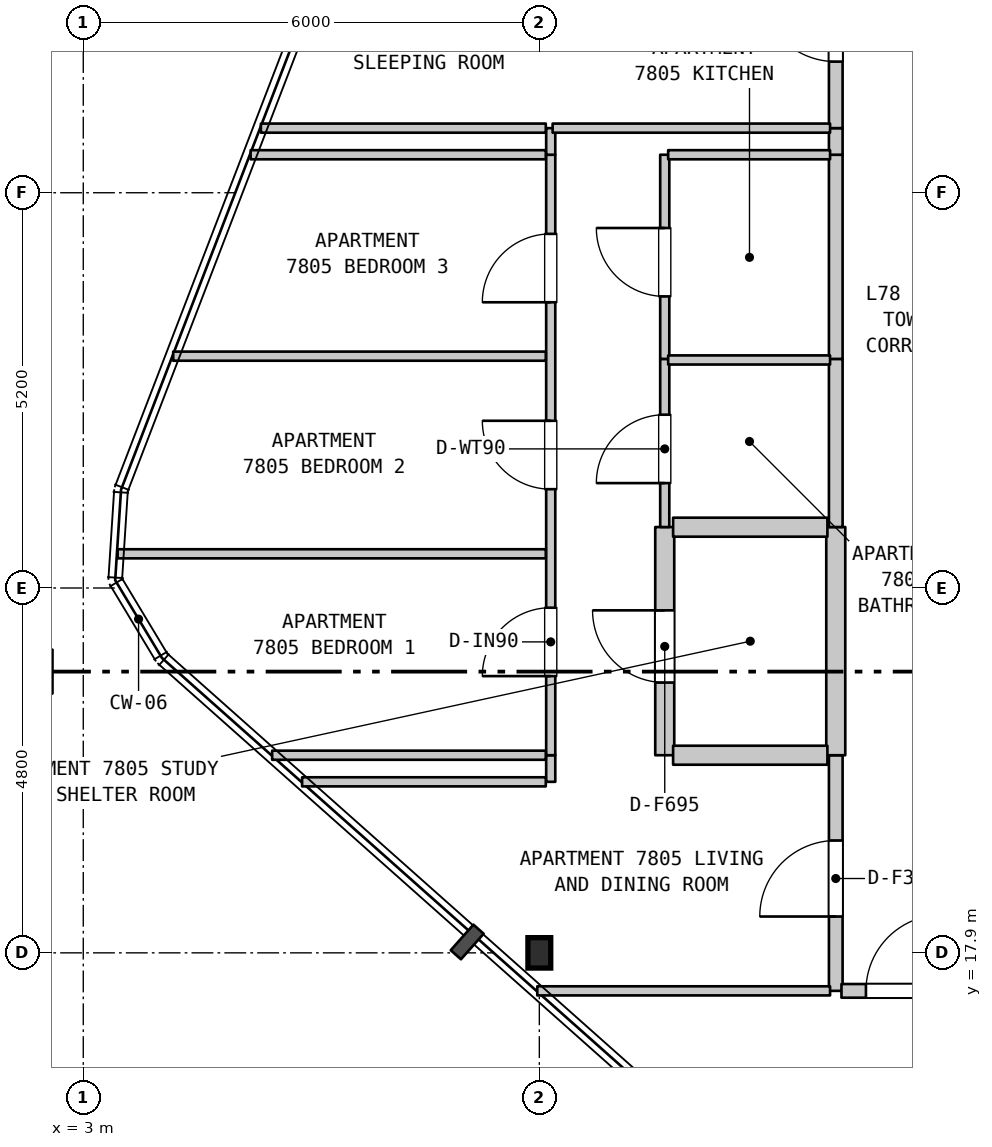
"""IFC4 building model, lengths in metres.
Left out: names, types, materials, properties, quantities, classifications, styles, units other than length and angle.
Written with IfcOpenShell. Run it as: python <this file> out.ifc"""

import sys

from ifc_helpers import new_model, si_unit, direction, frame, frame_2d, origin, origin_2d, place, context, subcontext, project, spatial, rectangle, i_section, extrude, element, fill, save


model = new_model("IFC4")
c1 = context("Model", 3, precision=1e-05, world=origin(), true_north=direction((0.0, 1.0)))
c2 = subcontext(c1, "Body", "Model", "MODEL_VIEW")
j1 = project(units=[si_unit("LENGTHUNIT", "METRE"), si_unit("PLANEANGLEUNIT", "RADIAN")], contexts=[c1])
p1 = place(None, origin())
s1 = spatial("IfcSite", under=j1, at=p1, CompositionType="ELEMENT")
p2 = place(p1, origin())
s2 = spatial("IfcBuilding", under=s1, at=p2, CompositionType="ELEMENT")
p3 = place(p2, frame((0.0, 0.0, 311.0)))
s3 = spatial("IfcBuildingStorey", under=s2, at=p3, CompositionType="ELEMENT", Elevation=311.0)
p4 = place(p3, frame((9.0, 17.9, 0.0), z_axis=(0.0, 0.0, 1.0), x_axis=(1.0, 0.0, 0.0)))
e1 = element("IfcColumn", 1, at=p4, inside=s3, PredefinedType="COLUMN", context=c2, shape_type="SweptSolid", body=[
    extrude(i_section(OverallWidth=0.3, OverallDepth=0.4, WebThickness=0.013, FlangeThickness=0.024, FilletRadius=0.027, at=origin_2d()), origin(), (0.0, 0.0, 1.0), 3.7),
])
p5 = place(p3, frame((9.15, 20.15, 0.0), z_axis=(0.0, 0.0, 1.0), x_axis=(0.0, 1.0, 0.0)))
e2 = element("IfcWall", 2, at=p5, inside=s3, PredefinedType="PARTITIONING", context=c2, shape_type="SweptSolid", body=[
    extrude(rectangle(XDim=0.35, YDim=0.12, at=frame_2d((0.175, 0.0))), origin(), (0.0, 0.0, 1.0), 3.28),
])
p6 = place(p3, frame((9.15, 20.5, 0.0), z_axis=(0.0, 0.0, 1.0), x_axis=(0.0, 1.0, 0.0)))
e3 = element("IfcWall", 3, at=p6, inside=s3, PredefinedType="PARTITIONING", context=c2, shape_type="SweptSolid", body=[
    extrude(rectangle(XDim=7.9, YDim=0.12, at=frame_2d((3.95, 0.0))), origin(), (0.0, 0.0, 1.0), 2.68),
])
p7 = place(p6, frame((1.041, 0.0, 0.0)))
e4 = element("IfcOpeningElement", 4, at=p7, cuts=e3, PredefinedType="OPENING", context=c2, shape_type="SweptSolid", body=[
    extrude(rectangle(XDim=0.9, YDim=2.15, at=frame_2d((0.45, 1.075))), frame((0.0, 0.07, 0.0), z_axis=(0.0, -1.0, 0.0), x_axis=(1.0, 0.0, 0.0)), (0.0, 0.0, 1.0), 0.14),
])
p8 = place(p6, frame((3.5, 0.0, 0.0)))
e5 = element("IfcOpeningElement", 5, at=p8, cuts=e3, PredefinedType="OPENING", context=c2, shape_type="SweptSolid", body=[
    extrude(rectangle(XDim=0.9, YDim=2.15, at=frame_2d((0.45, 1.075))), frame((0.0, 0.07, 0.0), z_axis=(0.0, -1.0, 0.0), x_axis=(1.0, 0.0, 0.0)), (0.0, 0.0, 1.0), 0.14),
])
p9 = place(p6, frame((5.959, 0.0, 0.0)))
e6 = element("IfcOpeningElement", 6, at=p9, cuts=e3, PredefinedType="OPENING", context=c2, shape_type="SweptSolid", body=[
    extrude(rectangle(XDim=0.9, YDim=2.15, at=frame_2d((0.45, 1.075))), frame((0.0, 0.07, 0.0), z_axis=(0.0, -1.0, 0.0), x_axis=(1.0, 0.0, 0.0)), (0.0, 0.0, 1.0), 0.14),
])
p10 = place(p3, frame((9.15, 28.4, 0.0), z_axis=(0.0, 0.0, 1.0), x_axis=(0.0, 1.0, 0.0)))
e7 = element("IfcWall", 7, at=p10, inside=s3, PredefinedType="PARTITIONING", context=c2, shape_type="SweptSolid", body=[
    extrude(rectangle(XDim=0.35, YDim=0.12, at=frame_2d((0.175, 0.0))), origin(), (0.0, 0.0, 1.0), 3.28),
])
p11 = place(p3, frame((10.65, 20.5, 0.0), z_axis=(0.0, 0.0, 1.0), x_axis=(0.0, 1.0, 0.0)))
e8 = element("IfcWall", 8, at=p11, inside=s3, PredefinedType="STANDARD", context=c2, shape_type="SweptSolid", body=[
    extrude(rectangle(XDim=3.002, YDim=0.25, at=frame_2d((1.501, 0.0))), origin(), (0.0, 0.0, 1.0), 3.28),
])
p12 = place(p11, frame((0.956, 0.0, 0.0)))
e9 = element("IfcOpeningElement", 9, at=p12, cuts=e8, PredefinedType="OPENING", context=c2, shape_type="SweptSolid", body=[
    extrude(rectangle(XDim=0.95, YDim=2.15, at=frame_2d((0.475, 1.075))), frame((0.0, 0.135, 0.0), z_axis=(0.0, -1.0, 0.0), x_axis=(1.0, 0.0, 0.0)), (0.0, 0.0, 1.0), 0.27),
])
p13 = place(p3, frame((10.65, 23.502, 0.0), z_axis=(0.0, 0.0, 1.0), x_axis=(0.0, 1.0, 0.0)))
e10 = element("IfcWall", 10, at=p13, inside=s3, PredefinedType="PARTITIONING", context=c2, shape_type="SweptSolid", body=[
    extrude(rectangle(XDim=2.212, YDim=0.12, at=frame_2d((1.106, 0.0))), origin(), (0.0, 0.0, 1.0), 3.28),
])
p14 = place(p13, frame((0.578, 0.0, 0.0)))
e11 = element("IfcOpeningElement", 11, at=p14, cuts=e10, PredefinedType="OPENING", context=c2, shape_type="SweptSolid", body=[
    extrude(rectangle(XDim=0.9, YDim=2.1, at=frame_2d((0.45, 1.05))), frame((0.0, 0.07, 0.0), z_axis=(0.0, -1.0, 0.0), x_axis=(1.0, 0.0, 0.0)), (0.0, 0.0, 1.0), 0.14),
])
p15 = place(p3, frame((10.65, 25.714, 0.0), z_axis=(0.0, 0.0, 1.0), x_axis=(0.0, 1.0, 0.0)))
e12 = element("IfcWall", 12, at=p15, inside=s3, PredefinedType="PARTITIONING", context=c2, shape_type="SweptSolid", body=[
    extrude(rectangle(XDim=2.686, YDim=0.12, at=frame_2d((1.343, 0.0))), origin(), (0.0, 0.0, 1.0), 3.28),
])
p16 = place(p15, frame((0.822, 0.0, 0.0)))
e13 = element("IfcOpeningElement", 13, at=p16, cuts=e12, PredefinedType="OPENING", context=c2, shape_type="SweptSolid", body=[
    extrude(rectangle(XDim=0.9, YDim=2.15, at=frame_2d((0.45, 1.075))), frame((0.0, 0.07, 0.0), z_axis=(0.0, -1.0, 0.0), x_axis=(1.0, 0.0, 0.0)), (0.0, 0.0, 1.0), 0.14),
])
p17 = place(p3, frame((12.9, 17.4, 0.0), z_axis=(0.0, 0.0, 1.0), x_axis=(0.0, 1.0, 0.0)))
e14 = element("IfcWall", 14, at=p17, inside=s3, PredefinedType="STANDARD", context=c2, shape_type="SweptSolid", body=[
    extrude(rectangle(XDim=3.1, YDim=0.18, at=frame_2d((1.55, 0.0))), origin(), (0.0, 0.0, 1.0), 3.28),
])
p18 = place(p17, frame((0.978, 0.0, 0.0)))
e15 = element("IfcOpeningElement", 15, at=p18, cuts=e14, PredefinedType="OPENING", context=c2, shape_type="SweptSolid", body=[
    extrude(rectangle(XDim=1.0, YDim=2.15, at=frame_2d((0.5, 1.075))), frame((0.0, 0.1, 0.0), z_axis=(0.0, -1.0, 0.0), x_axis=(1.0, 0.0, 0.0)), (0.0, 0.0, 1.0), 0.2),
])
p19 = place(p3, frame((12.9, 20.5, 0.0), z_axis=(0.0, 0.0, 1.0), x_axis=(0.0, 1.0, 0.0)))
e16 = element("IfcWall", 16, at=p19, inside=s3, PredefinedType="STANDARD", context=c2, shape_type="SweptSolid", body=[
    extrude(rectangle(XDim=3.002, YDim=0.25, at=frame_2d((1.501, 0.0))), origin(), (0.0, 0.0, 1.0), 3.28),
])
p20 = place(p3, frame((12.9, 23.502, 0.0), z_axis=(0.0, 0.0, 1.0), x_axis=(0.0, 1.0, 0.0)))
e17 = element("IfcWall", 17, at=p20, inside=s3, PredefinedType="STANDARD", context=c2, shape_type="SweptSolid", body=[
    extrude(rectangle(XDim=2.212, YDim=0.18, at=frame_2d((1.106, 0.0))), origin(), (0.0, 0.0, 1.0), 3.28),
])
p21 = place(p3, frame((12.9, 25.714, 0.0), z_axis=(0.0, 0.0, 1.0), x_axis=(0.0, 1.0, 0.0)))
e18 = element("IfcWall", 18, at=p21, inside=s3, PredefinedType="STANDARD", context=c2, shape_type="SweptSolid", body=[
    extrude(rectangle(XDim=2.686, YDim=0.18, at=frame_2d((1.343, 0.0))), origin(), (0.0, 0.0, 1.0), 3.28),
])
p22 = place(p3, frame((12.9, 28.4, 0.0), z_axis=(0.0, 0.0, 1.0), x_axis=(0.0, 1.0, 0.0)))
e19 = element("IfcWall", 19, at=p22, inside=s3, PredefinedType="STANDARD", context=c2, shape_type="SweptSolid", body=[
    extrude(rectangle(XDim=0.35, YDim=0.18, at=frame_2d((0.175, 0.0))), origin(), (0.0, 0.0, 1.0), 3.28),
])
p23 = place(p3, frame((12.9, 28.75, 0.0), z_axis=(0.0, 0.0, 1.0), x_axis=(0.0, 1.0, 0.0)))
e20 = element("IfcWall", 20, at=p23, inside=s3, PredefinedType="STANDARD", context=c2, shape_type="SweptSolid", body=[
    extrude(rectangle(XDim=2.75, YDim=0.18, at=frame_2d((1.375, 0.0))), origin(), (0.0, 0.0, 1.0), 3.28),
])
p24 = place(p23, frame((0.875, 0.0, 0.0)))
e21 = element("IfcOpeningElement", 21, at=p24, cuts=e20, PredefinedType="OPENING", context=c2, shape_type="SweptSolid", body=[
    extrude(rectangle(XDim=1.0, YDim=2.15, at=frame_2d((0.5, 1.075))), frame((0.0, 0.1, 0.0), z_axis=(0.0, -1.0, 0.0), x_axis=(1.0, 0.0, 0.0)), (0.0, 0.0, 1.0), 0.2),
])
p25 = place(p3, frame((8.973, 17.4, 0.0), z_axis=(0.0, 0.0, 1.0), x_axis=(1.0, 0.0, 0.0)))
e22 = element("IfcWall", 22, at=p25, inside=s3, PredefinedType="PARTITIONING", context=c2, shape_type="SweptSolid", body=[
    extrude(rectangle(XDim=3.852, YDim=0.12, at=frame_2d((1.926, 0.0))), origin(), (0.0, 0.0, 1.0), 3.28),
])
p26 = place(p3, frame((12.975, 17.4, 0.0), z_axis=(0.0, 0.0, 1.0), x_axis=(1.0, 0.0, 0.0)))
e23 = element("IfcWall", 23, at=p26, inside=s3, PredefinedType="STANDARD", context=c2, shape_type="SweptSolid", body=[
    extrude(rectangle(XDim=3.68, YDim=0.18, at=frame_2d((1.84, 0.0))), origin(), (0.0, 0.0, 1.0), 3.28),
])
p27 = place(p26, frame((0.322, 0.0, 0.0)))
e24 = element("IfcOpeningElement", 24, at=p27, cuts=e23, PredefinedType="OPENING", context=c2, shape_type="SweptSolid", body=[
    extrude(rectangle(XDim=1.0, YDim=2.15, at=frame_2d((0.5, 1.075))), frame((0.0, 0.1, 0.0), z_axis=(0.0, -1.0, 0.0), x_axis=(1.0, 0.0, 0.0)), (0.0, 0.0, 1.0), 0.2),
])
p28 = place(p3, frame((5.879, 20.15, 0.0), z_axis=(0.0, 0.0, 1.0), x_axis=(1.0, 0.0, 0.0)))
e25 = element("IfcWall", 25, at=p28, inside=s3, PredefinedType="PARTITIONING", context=c2, shape_type="SweptSolid", body=[
    extrude(rectangle(XDim=3.206, YDim=0.12, at=frame_2d((1.603, 0.0))), origin(), (0.0, 0.0, 1.0), 3.28),
])
p29 = place(p3, frame((5.485, 20.5, 0.0), z_axis=(0.0, 0.0, 1.0), x_axis=(1.0, 0.0, 0.0)))
e26 = element("IfcWall", 26, at=p29, inside=s3, PredefinedType="PARTITIONING", context=c2, shape_type="SweptSolid", body=[
    extrude(rectangle(XDim=3.6, YDim=0.12, at=frame_2d((1.8, 0.0))), origin(), (0.0, 0.0, 1.0), 3.28),
])
p30 = place(p3, frame((10.76, 20.5, 0.0), z_axis=(0.0, 0.0, 1.0), x_axis=(1.0, 0.0, 0.0)))
e27 = element("IfcWall", 27, at=p30, inside=s3, PredefinedType="STANDARD", context=c2, shape_type="SweptSolid", body=[
    extrude(rectangle(XDim=2.03, YDim=0.25, at=frame_2d((1.015, 0.0))), origin(), (0.0, 0.0, 1.0), 3.28),
])
p31 = place(p3, frame((3.452, 23.15, 0.0), z_axis=(0.0, 0.0, 1.0), x_axis=(1.0, 0.0, 0.0)))
e28 = element("IfcWall", 28, at=p31, inside=s3, PredefinedType="PARTITIONING", context=c2, shape_type="SweptSolid", body=[
    extrude(rectangle(XDim=5.633, YDim=0.12, at=frame_2d((2.816, 0.0))), origin(), (0.0, 0.0, 1.0), 3.28),
])
p32 = place(p3, frame((10.76, 23.5, 0.0), z_axis=(0.0, 0.0, 1.0), x_axis=(1.0, 0.0, 0.0)))
e29 = element("IfcWall", 29, at=p32, inside=s3, PredefinedType="STANDARD", context=c2, shape_type="SweptSolid", body=[
    extrude(rectangle(XDim=2.03, YDim=0.25, at=frame_2d((1.015, 0.0))), origin(), (0.0, 0.0, 1.0), 3.28),
])
p33 = place(p3, frame((10.695, 25.7, 0.0), z_axis=(0.0, 0.0, 1.0), x_axis=(1.0, 0.0, 0.0)))
e30 = element("IfcWall", 30, at=p33, inside=s3, PredefinedType="PARTITIONING", context=c2, shape_type="SweptSolid", body=[
    extrude(rectangle(XDim=2.13, YDim=0.12, at=frame_2d((1.065, 0.0))), origin(), (0.0, 0.0, 1.0), 3.28),
])
p34 = place(p3, frame((4.183, 25.75, 0.0), z_axis=(0.0, 0.0, 1.0), x_axis=(1.0, 0.0, 0.0)))
e31 = element("IfcWall", 31, at=p34, inside=s3, PredefinedType="PARTITIONING", context=c2, shape_type="SweptSolid", body=[
    extrude(rectangle(XDim=4.902, YDim=0.12, at=frame_2d((2.451, 0.0))), origin(), (0.0, 0.0, 1.0), 3.28),
])
p35 = place(p3, frame((5.202, 28.4, 0.0), z_axis=(0.0, 0.0, 1.0), x_axis=(1.0, 0.0, 0.0)))
e32 = element("IfcWall", 32, at=p35, inside=s3, PredefinedType="PARTITIONING", context=c2, shape_type="SweptSolid", body=[
    extrude(rectangle(XDim=3.883, YDim=0.12, at=frame_2d((1.941, 0.0))), origin(), (0.0, 0.0, 1.0), 3.28),
])
p36 = place(p3, frame((10.695, 28.4, 0.0), z_axis=(0.0, 0.0, 1.0), x_axis=(1.0, 0.0, 0.0)))
e33 = element("IfcWall", 33, at=p36, inside=s3, PredefinedType="PARTITIONING", context=c2, shape_type="SweptSolid", body=[
    extrude(rectangle(XDim=2.13, YDim=0.12, at=frame_2d((1.065, 0.0))), origin(), (0.0, 0.0, 1.0), 3.28),
])
p37 = place(p3, frame((5.337, 28.75, 0.0), z_axis=(0.0, 0.0, 1.0), x_axis=(1.0, 0.0, 0.0)))
e34 = element("IfcWall", 34, at=p37, inside=s3, PredefinedType="PARTITIONING", context=c2, shape_type="SweptSolid", body=[
    extrude(rectangle(XDim=3.748, YDim=0.12, at=frame_2d((1.874, 0.0))), origin(), (0.0, 0.0, 1.0), 3.28),
])
p38 = place(p3, frame((9.175, 28.75, 0.0), z_axis=(0.0, 0.0, 1.0), x_axis=(1.0, 0.0, 0.0)))
e35 = element("IfcWall", 35, at=p38, inside=s3, PredefinedType="PARTITIONING", context=c2, shape_type="SweptSolid", body=[
    extrude(rectangle(XDim=3.65, YDim=0.12, at=frame_2d((1.825, 0.0))), origin(), (0.0, 0.0, 1.0), 3.28),
])
p39 = place(p7, origin())
e36 = element("IfcDoor", 36, at=p39, inside=s3, OperationType="SINGLE_SWING_LEFT", PredefinedType="DOOR", context=c2, shape_type="SweptSolid", body=[
    extrude(rectangle(XDim=0.9, YDim=2.15, at=frame_2d((0.45, 1.075))), frame((0.0, 0.025, 0.0), z_axis=(0.0, -1.0, 0.0), x_axis=(1.0, 0.0, 0.0)), (0.0, 0.0, 1.0), 0.05),
])
fill(e4, e36)
p40 = place(p8, origin())
e37 = element("IfcDoor", 37, at=p40, inside=s3, OperationType="SINGLE_SWING_RIGHT", PredefinedType="DOOR", context=c2, shape_type="SweptSolid", body=[
    extrude(rectangle(XDim=0.9, YDim=2.15, at=frame_2d((0.45, 1.075))), frame((0.0, 0.025, 0.0), z_axis=(0.0, -1.0, 0.0), x_axis=(1.0, 0.0, 0.0)), (0.0, 0.0, 1.0), 0.05),
])
fill(e5, e37)
p41 = place(p9, origin())
e38 = element("IfcDoor", 38, at=p41, inside=s3, OperationType="SINGLE_SWING_LEFT", PredefinedType="DOOR", context=c2, shape_type="SweptSolid", body=[
    extrude(rectangle(XDim=0.9, YDim=2.15, at=frame_2d((0.45, 1.075))), frame((0.0, 0.025, 0.0), z_axis=(0.0, -1.0, 0.0), x_axis=(1.0, 0.0, 0.0)), (0.0, 0.0, 1.0), 0.05),
])
fill(e6, e38)
p42 = place(p12, origin())
e39 = element("IfcDoor", 39, at=p42, inside=s3, OperationType="SINGLE_SWING_RIGHT", PredefinedType="DOOR", context=c2, shape_type="SweptSolid", body=[
    extrude(rectangle(XDim=0.95, YDim=2.15, at=frame_2d((0.475, 1.075))), frame((0.0, 0.025, 0.0), z_axis=(0.0, -1.0, 0.0), x_axis=(1.0, 0.0, 0.0)), (0.0, 0.0, 1.0), 0.05),
])
fill(e9, e39)
p43 = place(p14, origin())
e40 = element("IfcDoor", 40, at=p43, inside=s3, OperationType="SINGLE_SWING_LEFT", PredefinedType="DOOR", context=c2, shape_type="SweptSolid", body=[
    extrude(rectangle(XDim=0.9, YDim=2.1, at=frame_2d((0.45, 1.05))), frame((0.0, 0.025, 0.0), z_axis=(0.0, -1.0, 0.0), x_axis=(1.0, 0.0, 0.0)), (0.0, 0.0, 1.0), 0.05),
])
fill(e11, e40)
p44 = place(p16, origin())
e41 = element("IfcDoor", 41, at=p44, inside=s3, OperationType="SINGLE_SWING_RIGHT", PredefinedType="DOOR", context=c2, shape_type="SweptSolid", body=[
    extrude(rectangle(XDim=0.9, YDim=2.15, at=frame_2d((0.45, 1.075))), frame((0.0, 0.025, 0.0), z_axis=(0.0, -1.0, 0.0), x_axis=(1.0, 0.0, 0.0)), (0.0, 0.0, 1.0), 0.05),
])
fill(e13, e41)
p45 = place(p18, origin())
e42 = element("IfcDoor", 42, at=p45, inside=s3, OperationType="SINGLE_SWING_LEFT", PredefinedType="DOOR", context=c2, shape_type="SweptSolid", body=[
    extrude(rectangle(XDim=1.0, YDim=2.15, at=frame_2d((0.5, 1.075))), frame((0.0, 0.025, 0.0), z_axis=(0.0, -1.0, 0.0), x_axis=(1.0, 0.0, 0.0)), (0.0, 0.0, 1.0), 0.05),
])
fill(e15, e42)
p46 = place(p24, origin())
e43 = element("IfcDoor", 43, at=p46, inside=s3, OperationType="SINGLE_SWING_RIGHT", PredefinedType="DOOR", context=c2, shape_type="SweptSolid", body=[
    extrude(rectangle(XDim=1.0, YDim=2.15, at=frame_2d((0.5, 1.075))), frame((0.0, 0.025, 0.0), z_axis=(0.0, -1.0, 0.0), x_axis=(1.0, 0.0, 0.0)), (0.0, 0.0, 1.0), 0.05),
])
fill(e21, e43)
p47 = place(p27, origin())
e44 = element("IfcDoor", 44, at=p47, inside=s3, OperationType="SINGLE_SWING_RIGHT", PredefinedType="DOOR", context=c2, shape_type="SweptSolid", body=[
    extrude(rectangle(XDim=1.0, YDim=2.15, at=frame_2d((0.5, 1.075))), frame((0.0, 0.025, 0.0), z_axis=(0.0, -1.0, 0.0), x_axis=(1.0, 0.0, 0.0)), (0.0, 0.0, 1.0), 0.05),
])
fill(e24, e44)
save(model, sys.argv[1])
